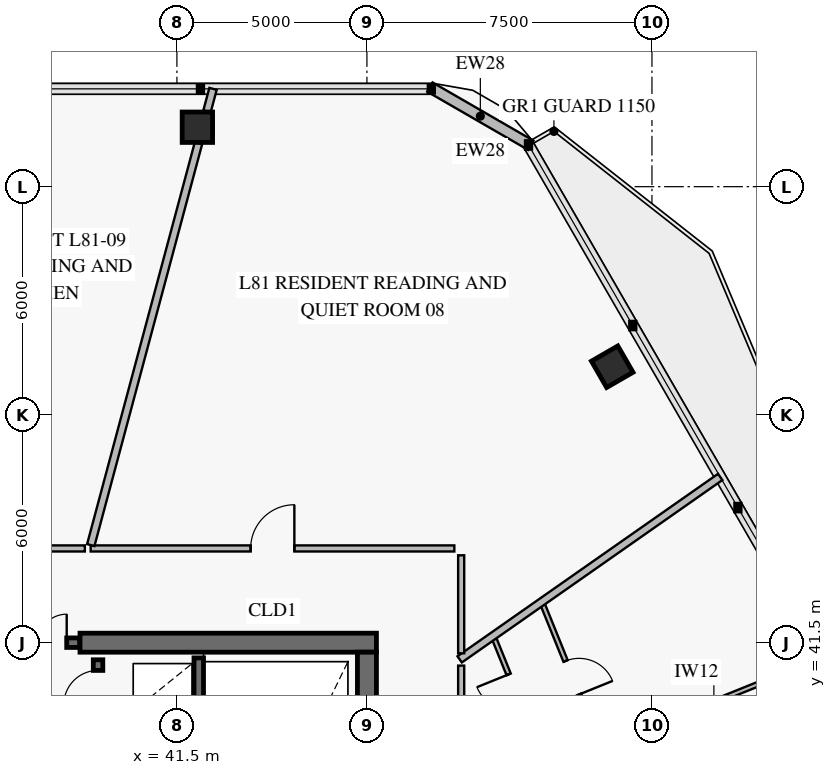
"""IFC4 building model, lengths in metres.
Left out: names, types, materials, properties, quantities, classifications, styles, units other than length and angle.
Written with IfcOpenShell. Run it as: python <this file> out.ifc"""

import sys

from ifc_helpers import new_model, si_unit, direction, frame, frame_2d, origin, origin_2d, place, context, subcontext, project, spatial, rectangle, extrude, element, fill, save


model = new_model("IFC4")
c1 = context("Model", 3, precision=1e-05, world=origin(), true_north=direction((0.0, 1.0)))
c2 = subcontext(c1, "Body", "Model", "MODEL_VIEW")
j1 = project(units=[si_unit("LENGTHUNIT", "METRE"), si_unit("PLANEANGLEUNIT", "RADIAN")], contexts=[c1])
p1 = place(None, origin())
s1 = spatial("IfcSite", under=j1, at=p1, CompositionType="ELEMENT")
p2 = place(p1, origin())
s2 = spatial("IfcBuilding", under=s1, at=p2, CompositionType="ELEMENT")
p3 = place(p2, frame((0.0, 0.0, 319.6)))
s3 = spatial("IfcBuildingStorey", under=s2, at=p3, CompositionType="ELEMENT", Elevation=319.6)
p4 = place(p3, frame((46.75, 41.5, 0.0), z_axis=(0.0, 0.0, 1.0), x_axis=(-1.0, 0.0, 0.0)))
e1 = element("IfcWall", 1, at=p4, inside=s3, PredefinedType="SHEAR", context=c2, shape_type="SweptSolid", body=[
    extrude(rectangle(XDim=7.8, YDim=0.5, at=frame_2d((3.9, 0.0))), origin(), (0.0, 0.0, 1.0), 3.8),
])
p5 = place(p3, frame((46.5, 22.75, 0.0), z_axis=(0.0, 0.0, 1.0), x_axis=(0.0, 1.0, 0.0)))
e2 = element("IfcWall", 2, at=p5, inside=s3, PredefinedType="SHEAR", context=c2, shape_type="SweptSolid", body=[
    extrude(rectangle(XDim=18.5, YDim=0.5, at=frame_2d((9.25, 0.0))), origin(), (0.0, 0.0, 1.0), 3.8),
])
p6 = place(p5, frame((9.0, 0.0, 0.0)))
e3 = element("IfcOpeningElement", 3, at=p6, cuts=e2, PredefinedType="OPENING", context=c2, shape_type="SweptSolid", body=[
    extrude(rectangle(XDim=1.1, YDim=2.15, at=frame_2d((0.55, 1.075))), frame((0.0, 0.262, 0.0), z_axis=(0.0, -1.0, 0.0), x_axis=(1.0, 0.0, 0.0)), (0.0, 0.0, 1.0), 0.524),
])
for number, where, z_axis, x_axis in (
    (4, (52.955, 48.762, 0.0), (0.0, 0.0, 1.0), (-0.5, 0.866, 0.0)),
    (5, (42.039, 55.064, 0.0), (0.0, 0.0, 1.0), (-1.0, 0.0, 0.0)),
):
    element("IfcColumn", number, at=place(p3, frame(where, z_axis=z_axis, x_axis=x_axis)), inside=s3, PredefinedType="COLUMN", context=c2, shape_type="SweptSolid", body=[
        extrude(rectangle(XDim=0.8, YDim=0.8, at=origin_2d()), origin(), (0.0, 0.0, 1.0), 3.55),
    ])
p7 = place(p3, frame((48.157, 56.122, 0.0), z_axis=(0.0, 0.0, 1.0), x_axis=(0.866023752521, -0.50000286006, 0.0)))
e6 = element("IfcWall", 6, at=p7, inside=s3, PredefinedType="SOLIDWALL", context=c2, shape_type="SweptSolid", body=[
    extrude(rectangle(XDim=3.065, YDim=0.28, at=frame_2d((1.532, 0.0))), origin(), (0.0, 0.0, 1.0), 3.55),
])
p8 = place(p3, frame((36.76, 41.5, 0.0), z_axis=(0.0, 0.0, 1.0), x_axis=(1.0, 0.0, 0.0)))
e7 = element("IfcWall", 7, at=p8, inside=s3, PredefinedType="SOLIDWALL", context=c2, shape_type="SweptSolid", body=[
    extrude(rectangle(XDim=2.18, YDim=0.25, at=frame_2d((1.09, 0.0))), origin(), (0.0, 0.0, 1.0), 3.8),
])
p9 = place(p8, frame((0.34, 0.0, 0.0)))
e8 = element("IfcOpeningElement", 8, at=p9, cuts=e7, PredefinedType="OPENING", context=c2, shape_type="SweptSolid", body=[
    extrude(rectangle(XDim=1.5, YDim=2.15, at=frame_2d((0.75, 1.075))), frame((0.0, 0.137, 0.0), z_axis=(0.0, -1.0, 0.0), x_axis=(1.0, 0.0, 0.0)), (0.0, 0.0, 1.0), 0.274),
])
p10 = place(p3, frame((42.075, 31.4, 0.0), z_axis=(0.0, 0.0, 1.0), x_axis=(0.0, 1.0, 0.0)))
e9 = element("IfcWall", 9, at=p10, inside=s3, PredefinedType="SOLIDWALL", context=c2, shape_type="SweptSolid", body=[
    extrude(rectangle(XDim=9.7, YDim=0.25, at=frame_2d((4.85, 0.0))), origin(), (0.0, 0.0, 1.0), 3.8),
])
p11 = place(p3, frame((39.425, 31.4, 0.0), z_axis=(0.0, 0.0, 1.0), x_axis=(0.0, 1.0, 0.0)))
e10 = element("IfcWall", 10, at=p11, inside=s3, PredefinedType="SOLIDWALL", context=c2, shape_type="SweptSolid", body=[
    extrude(rectangle(XDim=9.65, YDim=0.25, at=frame_2d((4.825, 0.0))), origin(), (0.0, 0.0, 1.0), 3.8),
])
p12 = place(p11, frame((0.7, 0.0, 0.0)))
e11 = element("IfcOpeningElement", 11, at=p12, cuts=e10, PredefinedType="OPENING", context=c2, shape_type="SweptSolid", body=[
    extrude(rectangle(XDim=1.1, YDim=2.2, at=frame_2d((0.55, 1.1))), frame((0.0, 0.137, 0.0), z_axis=(0.0, -1.0, 0.0), x_axis=(1.0, 0.0, 0.0)), (0.0, 0.0, 1.0), 0.274),
])
p13 = place(p11, frame((3.45, 0.0, 0.0)))
e12 = element("IfcOpeningElement", 12, at=p13, cuts=e10, PredefinedType="OPENING", context=c2, shape_type="SweptSolid", body=[
    extrude(rectangle(XDim=1.1, YDim=2.2, at=frame_2d((0.55, 1.1))), frame((0.0, 0.137, 0.0), z_axis=(0.0, -1.0, 0.0), x_axis=(1.0, 0.0, 0.0)), (0.0, 0.0, 1.0), 0.274),
])
p14 = place(p11, frame((6.2, 0.0, 0.0)))
e13 = element("IfcOpeningElement", 13, at=p14, cuts=e10, PredefinedType="OPENING", context=c2, shape_type="SweptSolid", body=[
    extrude(rectangle(XDim=1.1, YDim=2.2, at=frame_2d((0.55, 1.1))), frame((0.0, 0.137, 0.0), z_axis=(0.0, -1.0, 0.0), x_axis=(1.0, 0.0, 0.0)), (0.0, 0.0, 1.0), 0.274),
])
p15 = place(p11, frame((8.47, 0.0, 0.0)))
e14 = element("IfcOpeningElement", 14, at=p15, cuts=e10, PredefinedType="OPENING", context=c2, shape_type="SweptSolid", body=[
    extrude(rectangle(XDim=0.9, YDim=2.1, at=frame_2d((0.45, 1.05))), frame((0.0, 0.137, 0.0), z_axis=(0.0, -1.0, 0.0), x_axis=(1.0, 0.0, 0.0)), (0.0, 0.0, 1.0), 0.274),
])
p16 = place(p3, frame((52.644, 34.696, 0.0), z_axis=(0.0, 0.0, 1.0), x_axis=(-0.374926411414, 0.927054575537, 0.0)))
e15 = element("IfcWall", 15, at=p16, inside=s3, PredefinedType="PARTITIONING", context=c2, shape_type="SweptSolid", body=[
    extrude(rectangle(XDim=7.483, YDim=0.12, at=frame_2d((3.741, 0.0))), origin(), (0.0, 0.0, 1.0), 3.0),
])
p17 = place(p16, frame((1.877, 0.0, 0.0)))
e16 = element("IfcOpeningElement", 16, at=p17, cuts=e15, PredefinedType="OPENING", context=c2, shape_type="SweptSolid", body=[
    extrude(rectangle(XDim=0.95, YDim=2.1, at=frame_2d((0.475, 1.05))), frame((0.0, 0.072, 0.0), z_axis=(0.0, -1.0, 0.0), x_axis=(1.0, 0.0, 0.0)), (0.0, 0.0, 1.0), 0.144),
])
p18 = place(p16, frame((5.541, 0.0, 0.0)))
e17 = element("IfcOpeningElement", 17, at=p18, cuts=e15, PredefinedType="OPENING", context=c2, shape_type="SweptSolid", body=[
    extrude(rectangle(XDim=0.9, YDim=2.1, at=frame_2d((0.45, 1.05))), frame((0.0, 0.072, 0.0), z_axis=(0.0, -1.0, 0.0), x_axis=(1.0, 0.0, 0.0)), (0.0, 0.0, 1.0), 0.144),
])
p19 = place(p3, frame((54.179, 34.954, 0.0), z_axis=(0.0, 0.0, 1.0), x_axis=(-0.374928779354, 0.927053617873, 0.0)))
e18 = element("IfcWall", 18, at=p19, inside=s3, PredefinedType="PARTITIONING", context=c2, shape_type="SweptSolid", body=[
    extrude(rectangle(XDim=8.155, YDim=0.12, at=frame_2d((4.078, 0.0))), origin(), (0.0, 0.0, 1.0), 3.0),
])
p20 = place(p19, frame((1.614, 0.0, 0.0)))
e19 = element("IfcOpeningElement", 19, at=p20, cuts=e18, PredefinedType="OPENING", context=c2, shape_type="SweptSolid", body=[
    extrude(rectangle(XDim=0.95, YDim=2.1, at=frame_2d((0.475, 1.05))), frame((0.0, 0.072, 0.0), z_axis=(0.0, -1.0, 0.0), x_axis=(1.0, 0.0, 0.0)), (0.0, 0.0, 1.0), 0.144),
])
p21 = place(p19, frame((5.592, 0.0, 0.0)))
e20 = element("IfcOpeningElement", 20, at=p21, cuts=e18, PredefinedType="OPENING", context=c2, shape_type="SweptSolid", body=[
    extrude(rectangle(XDim=0.95, YDim=2.1, at=frame_2d((0.475, 1.05))), frame((0.0, 0.072, 0.0), z_axis=(0.0, -1.0, 0.0), x_axis=(1.0, 0.0, 0.0)), (0.0, 0.0, 1.0), 0.144),
])
p22 = place(p3, frame((48.8, 43.98, 0.0), z_axis=(0.0, 0.0, 1.0), x_axis=(-1.0, 0.0, 0.0)))
e21 = element("IfcWall", 21, at=p22, inside=s3, PredefinedType="PARTITIONING", context=c2, shape_type="SweptSolid", body=[
    extrude(rectangle(XDim=9.569, YDim=0.16, at=frame_2d((4.785, 0.0))), origin(), (0.0, 0.0, 1.0), 3.0),
])
p23 = place(p22, frame((4.21, 0.0, 0.0)))
e22 = element("IfcOpeningElement", 22, at=p23, cuts=e21, PredefinedType="OPENING", context=c2, shape_type="SweptSolid", body=[
    extrude(rectangle(XDim=1.15, YDim=2.2, at=frame_2d((0.575, 1.1))), frame((0.0, 0.092, 0.0), z_axis=(0.0, -1.0, 0.0), x_axis=(1.0, 0.0, 0.0)), (0.0, 0.0, 1.0), 0.184),
])
p24 = place(p3, frame((52.714, 38.76, 0.0), z_axis=(0.0, 0.0, 1.0), x_axis=(0.927048652302, 0.374941057056, 0.0)))
e23 = element("IfcWall", 23, at=p24, inside=s3, PredefinedType="PARTITIONING", context=c2, shape_type="SweptSolid", body=[
    extrude(rectangle(XDim=6.291, YDim=0.12, at=frame_2d((3.146, 0.0))), origin(), (0.0, 0.0, 1.0), 2.97),
])
p25 = place(p3, frame((48.94, 41.061, 0.0), z_axis=(0.0, 0.0, 1.0), x_axis=(0.819159279368, 0.573566103448, 0.0)))
e24 = element("IfcWall", 24, at=p25, inside=s3, PredefinedType="PARTITIONING", context=c2, shape_type="SweptSolid", body=[
    extrude(rectangle(XDim=8.369, YDim=0.2, at=frame_2d((4.185, 0.0))), origin(), (0.0, 0.0, 1.0), 2.97),
])
p26 = place(p3, frame((39.234, 44.068, 0.0), z_axis=(0.0, 0.0, 1.0), x_axis=(0.258812989646, 0.965927448823, 0.0)))
e25 = element("IfcWall", 25, at=p26, inside=s3, PredefinedType="PARTITIONING", context=c2, shape_type="SweptSolid", body=[
    extrude(rectangle(XDim=10.949, YDim=0.2, at=frame_2d((5.475, 0.0))), origin(), (0.0, 0.0, 1.0), 3.0),
])
p27 = place(p3, frame((42.292, 55.484, 0.0), z_axis=(0.0, 0.0, 1.0), x_axis=(0.258955805871, 0.965889170974, 0.0)))
e26 = element("IfcWall", 26, at=p27, inside=s3, PredefinedType="PARTITIONING", context=c2, shape_type="SweptSolid", body=[
    extrude(rectangle(XDim=0.611, YDim=0.2, at=frame_2d((0.305, 0.0))), origin(), (0.0, 0.0, 1.0), 3.122),
])
p28 = place(p3, frame((48.98, 38.132, 0.0), z_axis=(0.0, 0.0, 1.0), x_axis=(0.0, 1.0, 0.0)))
e27 = element("IfcWall", 27, at=p28, inside=s3, PredefinedType="PARTITIONING", context=c2, shape_type="SweptSolid", body=[
    extrude(rectangle(XDim=2.765, YDim=0.16, at=frame_2d((1.382, 0.0))), origin(), (0.0, 0.0, 1.0), 3.55),
])
p29 = place(p3, frame((48.98, 41.221, 0.0), z_axis=(0.0, 0.0, 1.0), x_axis=(0.0, 1.0, 0.0)))
e28 = element("IfcWall", 28, at=p29, inside=s3, PredefinedType="PARTITIONING", context=c2, shape_type="SweptSolid", body=[
    extrude(rectangle(XDim=2.579, YDim=0.16, at=frame_2d((1.29, 0.0))), origin(), (0.0, 0.0, 1.0), 3.55),
])
p30 = place(p3, frame((39.078, 43.98, 0.0), z_axis=(0.0, 0.0, 1.0), x_axis=(-1.0, 0.0, 0.0)))
e29 = element("IfcWall", 29, at=p30, inside=s3, PredefinedType="PARTITIONING", context=c2, shape_type="SweptSolid", body=[
    extrude(rectangle(XDim=1.71, YDim=0.16, at=frame_2d((0.855, 0.0))), origin(), (0.0, 0.0, 1.0), 3.0),
])
p31 = place(p9, origin())
e30 = element("IfcDoor", 30, at=p31, inside=s3, OperationType="DOUBLE_DOOR_SINGLE_SWING", PredefinedType="DOOR", context=c2, shape_type="SweptSolid", body=[
    extrude(rectangle(XDim=1.5, YDim=2.15, at=frame_2d((0.75, 1.075))), frame((0.0, 0.025, 0.0), z_axis=(0.0, -1.0, 0.0), x_axis=(1.0, 0.0, 0.0)), (0.0, 0.0, 1.0), 0.05),
])
fill(e8, e30)
p32 = place(p15, origin())
e31 = element("IfcDoor", 31, at=p32, inside=s3, OperationType="SINGLE_SWING_LEFT", PredefinedType="DOOR", context=c2, shape_type="SweptSolid", body=[
    extrude(rectangle(XDim=0.9, YDim=2.1, at=frame_2d((0.45, 1.05))), frame((0.0, 0.025, 0.0), z_axis=(0.0, -1.0, 0.0), x_axis=(1.0, 0.0, 0.0)), (0.0, 0.0, 1.0), 0.05),
])
fill(e14, e31)
p33 = place(p18, origin())
e32 = element("IfcDoor", 32, at=p33, inside=s3, OperationType="SINGLE_SWING_RIGHT", PredefinedType="DOOR", context=c2, shape_type="SweptSolid", body=[
    extrude(rectangle(XDim=0.9, YDim=2.1, at=frame_2d((0.45, 1.05))), frame((0.0, 0.025, 0.0), z_axis=(0.0, -1.0, 0.0), x_axis=(1.0, 0.0, 0.0)), (0.0, 0.0, 1.0), 0.05),
])
fill(e17, e32)
p34 = place(p21, frame((0.95, 0.0, 0.0), z_axis=(0.0, 0.0, 1.0), x_axis=(-1.0, 0.0, 0.0)))
e33 = element("IfcDoor", 33, at=p34, inside=s3, OperationType="SINGLE_SWING_RIGHT", PredefinedType="DOOR", context=c2, shape_type="SweptSolid", body=[
    extrude(rectangle(XDim=0.95, YDim=2.1, at=frame_2d((0.475, 1.05))), frame((0.0, 0.025, 0.0), z_axis=(0.0, -1.0, 0.0), x_axis=(1.0, 0.0, 0.0)), (0.0, 0.0, 1.0), 0.05),
])
fill(e20, e33)
p35 = place(p23, frame((1.15, 0.0, 0.0), z_axis=(0.0, 0.0, 1.0), x_axis=(-1.0, 0.0, 0.0)))
e34 = element("IfcDoor", 34, at=p35, inside=s3, OperationType="SINGLE_SWING_RIGHT", PredefinedType="DOOR", context=c2, shape_type="SweptSolid", body=[
    extrude(rectangle(XDim=1.15, YDim=2.2, at=frame_2d((0.575, 1.1))), frame((0.0, 0.025, 0.0), z_axis=(0.0, -1.0, 0.0), x_axis=(1.0, 0.0, 0.0)), (0.0, 0.0, 1.0), 0.05),
])
fill(e22, e34)
save(model, sys.argv[1])
